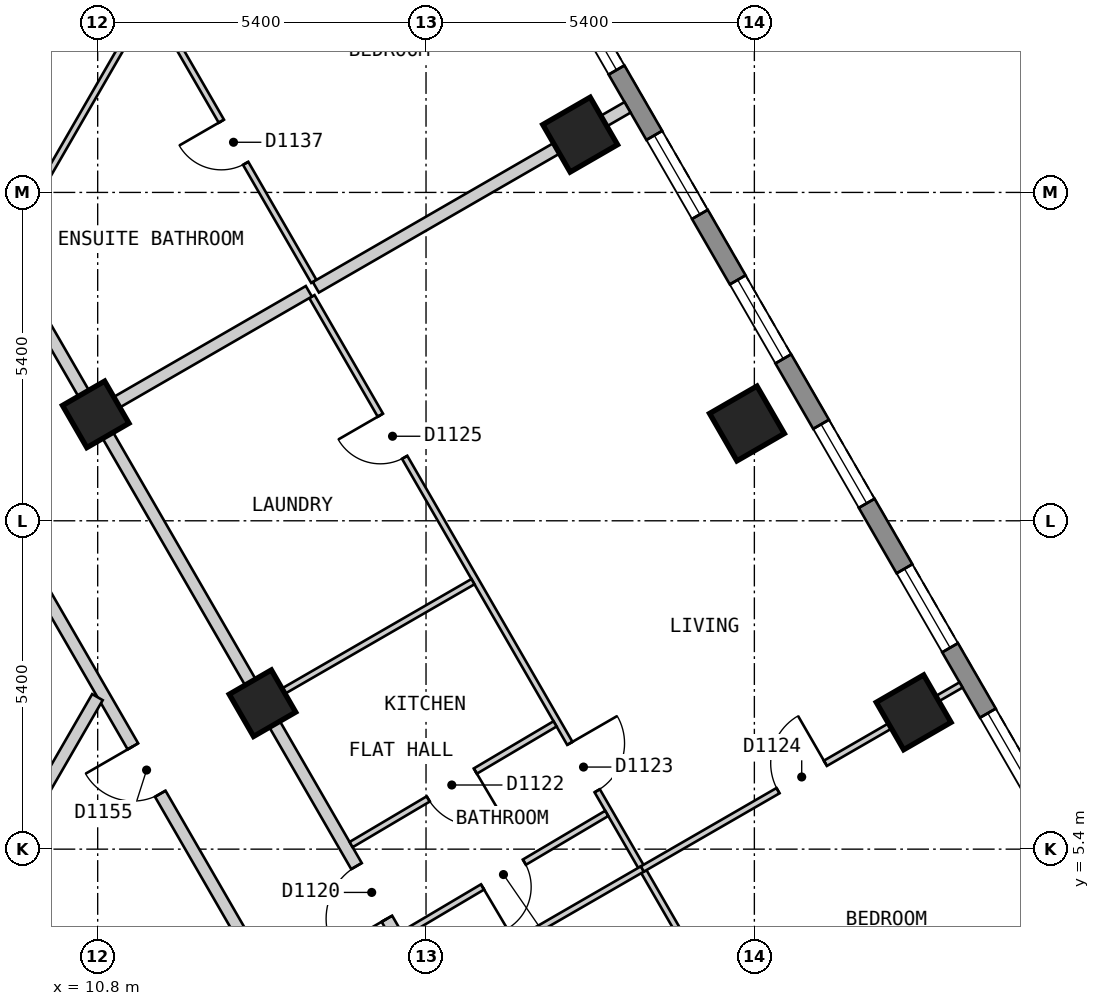
"""IFC4 building model, lengths in metres.
Left out: names, types, materials, properties, quantities, classifications, styles, units other than length and angle.
Written with IfcOpenShell. Run it as: python <this file> out.ifc"""

import sys

from ifc_helpers import new_model, si_unit, direction, frame, frame_2d, origin, origin_2d, place, context, subcontext, project, spatial, polyline, rectangle, outline, extrude, element, fill, save


model = new_model("IFC4")
c1 = context("Model", 3, precision=1e-05, world=origin(), true_north=direction((0.0, 1.0)))
c2 = subcontext(c1, "Body", "Model", "MODEL_VIEW")
j1 = project(units=[si_unit("LENGTHUNIT", "METRE"), si_unit("PLANEANGLEUNIT", "RADIAN")], contexts=[c1])
p1 = place(None, origin())
s1 = spatial("IfcSite", under=j1, at=p1, CompositionType="ELEMENT")
p2 = place(p1, origin())
s2 = spatial("IfcBuilding", under=s1, at=p2, CompositionType="ELEMENT")
p3 = place(p2, frame((0.0, 0.0, 144.6)))
s3 = spatial("IfcBuildingStorey", under=s2, at=p3, CompositionType="ELEMENT", Elevation=144.6)
for number, where, z_axis, x_axis in (
    (1, (24.22, 7.65, 0.0), (0.0, 0.0, 1.0), (-0.5, 0.866, 0.0)),
    (2, (21.478, 12.4, 0.0), (0.0, 0.0, 1.0), (-0.5, 0.866, 0.0)),
    (3, (18.735, 17.15, 0.0), (0.0, 0.0, 1.0), (-0.5, 0.866, 0.0)),
):
    element("IfcColumn", number, at=place(p3, frame(where, z_axis=z_axis, x_axis=x_axis)), inside=s3, PredefinedType="COLUMN", context=c2, shape_type="SweptSolid", body=[
        extrude(rectangle(XDim=0.9, YDim=0.9, at=origin_2d()), origin(), (0.0, 0.0, 1.0), 3.0),
    ])
for number, where, z_axis, x_axis in (
    (4, (13.51, 7.8, 0.0), (0.0, 0.0, 1.0), (-0.5, 0.866, 0.0)),
    (5, (10.768, 12.55, 0.0), (0.0, 0.0, 1.0), (-0.5, 0.866, 0.0)),
):
    element("IfcColumn", number, at=place(p3, frame(where, z_axis=z_axis, x_axis=x_axis)), inside=s3, PredefinedType="COLUMN", context=c2, shape_type="SweptSolid", body=[
        extrude(rectangle(XDim=0.8, YDim=0.8, at=origin_2d()), origin(), (0.0, 0.0, 1.0), 3.0),
    ])
p4 = place(p3, frame((28.218, 2.825, 0.0), z_axis=(0.0, 0.0, 1.0), x_axis=(-0.500020536353, 0.866013546791, 0.0)))
e6 = element("IfcWall", 6, at=p4, inside=s3, PredefinedType="SOLIDWALL", context=c2, shape_type="SweptSolid", body=[
    extrude(outline(polyline([(0.0, -0.15), (23.325, -0.15), (23.245, 0.15), (0.08, 0.15), (0.0, -0.15)])), origin(), (0.0, 0.0, 1.0), 2.7),
])
p5 = place(p4, frame((1.314, 0.0, 0.15)))
e7 = element("IfcOpeningElement", 7, at=p5, cuts=e6, PredefinedType="OPENING", context=c2, shape_type="SweptSolid", body=[
    extrude(rectangle(XDim=1.5, YDim=2.1, at=frame_2d((0.75, 1.05))), frame((0.0, 0.16, 0.0), z_axis=(0.0, -1.0, 0.0), x_axis=(1.0, 0.0, 0.0)), (0.0, 0.0, 1.0), 0.32),
])
p6 = place(p4, frame((4.056, 0.0, 0.15)))
e8 = element("IfcOpeningElement", 8, at=p6, cuts=e6, PredefinedType="OPENING", context=c2, shape_type="SweptSolid", body=[
    extrude(rectangle(XDim=1.5, YDim=2.1, at=frame_2d((0.75, 1.05))), frame((0.0, 0.16, 0.0), z_axis=(0.0, -1.0, 0.0), x_axis=(1.0, 0.0, 0.0)), (0.0, 0.0, 1.0), 0.32),
])
p7 = place(p4, frame((6.798, 0.0, 0.15)))
e9 = element("IfcOpeningElement", 9, at=p7, cuts=e6, PredefinedType="OPENING", context=c2, shape_type="SweptSolid", body=[
    extrude(rectangle(XDim=1.5, YDim=2.1, at=frame_2d((0.75, 1.05))), frame((0.0, 0.16, 0.0), z_axis=(0.0, -1.0, 0.0), x_axis=(1.0, 0.0, 0.0)), (0.0, 0.0, 1.0), 0.32),
])
p8 = place(p4, frame((9.541, 0.0, 0.15)))
e10 = element("IfcOpeningElement", 10, at=p8, cuts=e6, PredefinedType="OPENING", context=c2, shape_type="SweptSolid", body=[
    extrude(rectangle(XDim=1.5, YDim=2.1, at=frame_2d((0.75, 1.05))), frame((0.0, 0.16, 0.0), z_axis=(0.0, -1.0, 0.0), x_axis=(1.0, 0.0, 0.0)), (0.0, 0.0, 1.0), 0.32),
])
p9 = place(p4, frame((12.284, 0.0, 0.15)))
e11 = element("IfcOpeningElement", 11, at=p9, cuts=e6, PredefinedType="OPENING", context=c2, shape_type="SweptSolid", body=[
    extrude(rectangle(XDim=1.5, YDim=2.1, at=frame_2d((0.75, 1.05))), frame((0.0, 0.16, 0.0), z_axis=(0.0, -1.0, 0.0), x_axis=(1.0, 0.0, 0.0)), (0.0, 0.0, 1.0), 0.32),
])
p10 = place(p4, frame((15.027, 0.0, 0.15)))
e12 = element("IfcOpeningElement", 12, at=p10, cuts=e6, PredefinedType="OPENING", context=c2, shape_type="SweptSolid", body=[
    extrude(rectangle(XDim=1.5, YDim=2.1, at=frame_2d((0.75, 1.05))), frame((0.0, 0.16, 0.0), z_axis=(0.0, -1.0, 0.0), x_axis=(1.0, 0.0, 0.0)), (0.0, 0.0, 1.0), 0.32),
])
p11 = place(p4, frame((17.769, 0.0, 0.15)))
e13 = element("IfcOpeningElement", 13, at=p11, cuts=e6, PredefinedType="OPENING", context=c2, shape_type="SweptSolid", body=[
    extrude(rectangle(XDim=1.5, YDim=2.1, at=frame_2d((0.75, 1.05))), frame((0.0, 0.16, 0.0), z_axis=(0.0, -1.0, 0.0), x_axis=(1.0, 0.0, 0.0)), (0.0, 0.0, 1.0), 0.32),
])
p12 = place(p4, frame((20.511, 0.0, 0.15)))
e14 = element("IfcOpeningElement", 14, at=p12, cuts=e6, PredefinedType="OPENING", context=c2, shape_type="SweptSolid", body=[
    extrude(rectangle(XDim=1.5, YDim=2.1, at=frame_2d((0.75, 1.05))), frame((0.0, 0.16, 0.0), z_axis=(0.0, -1.0, 0.0), x_axis=(1.0, 0.0, 0.0)), (0.0, 0.0, 1.0), 0.32),
])
p13 = place(p3, frame((7.967, 13.0, 0.0), z_axis=(0.0, 0.0, 1.0), x_axis=(0.50003774998, -0.866003607726, 0.0)))
e15 = element("IfcWall", 15, at=p13, inside=s3, PredefinedType="PARTITIONING", context=c2, shape_type="SweptSolid", body=[
    extrude(rectangle(XDim=14.433, YDim=0.2, at=frame_2d((7.217, 0.0))), origin(), (0.0, 0.0, 1.0), 2.7),
])
p14 = place(p13, frame((6.824, 0.0, 0.0)))
e16 = element("IfcOpeningElement", 16, at=p14, cuts=e15, PredefinedType="OPENING", context=c2, shape_type="SweptSolid", body=[
    extrude(rectangle(XDim=0.9, YDim=2.1, at=frame_2d((0.45, 1.05))), frame((0.0, 0.11, 0.0), z_axis=(0.0, -1.0, 0.0), x_axis=(1.0, 0.0, 0.0)), (0.0, 0.0, 1.0), 0.22),
])
p15 = place(p3, frame((9.296, 15.1, 0.0), z_axis=(0.0, 0.0, 1.0), x_axis=(0.499974024244, -0.866040400375, 0.0)))
e17 = element("IfcWall", 17, at=p15, inside=s3, PredefinedType="PARTITIONING", context=c2, shape_type="SweptSolid", body=[
    extrude(rectangle(XDim=16.857, YDim=0.2, at=frame_2d((8.429, 0.0))), origin(), (0.0, 0.0, 1.0), 2.7),
])
p16 = place(p15, frame((11.522, 0.0, 0.0)))
e18 = element("IfcOpeningElement", 18, at=p16, cuts=e17, PredefinedType="OPENING", context=c2, shape_type="SweptSolid", body=[
    extrude(rectangle(XDim=1.0, YDim=2.1, at=frame_2d((0.5, 1.05))), frame((0.0, 0.11, 0.0), z_axis=(0.0, -1.0, 0.0), x_axis=(1.0, 0.0, 0.0)), (0.0, 0.0, 1.0), 0.22),
])
p17 = place(p3, frame((7.028, 1.373, 0.0), z_axis=(0.0, 0.0, 1.0), x_axis=(0.499954271211, 0.866051803703, 0.0)))
e19 = element("IfcWall", 19, at=p17, inside=s3, PredefinedType="PARTITIONING", context=c2, shape_type="SweptSolid", body=[
    extrude(rectangle(XDim=7.536, YDim=0.2, at=frame_2d((3.768, 0.0))), origin(), (0.0, 0.0, 1.0), 2.7),
])
p18 = place(p3, frame((14.323, 14.487, 0.0), z_axis=(0.0, 0.0, 1.0), x_axis=(0.500011052545, -0.866019022501, 0.0)))
e20 = element("IfcWall", 20, at=p18, inside=s3, PredefinedType="PARTITIONING", context=c2, shape_type="SweptSolid", body=[
    extrude(rectangle(XDim=16.208, YDim=0.1, at=frame_2d((8.104, 0.0))), origin(), (0.0, 0.0, 1.0), 2.7),
])
p19 = place(p18, frame((8.484, 0.0, 0.0)))
e21 = element("IfcOpeningElement", 21, at=p19, cuts=e20, PredefinedType="OPENING", context=c2, shape_type="SweptSolid", body=[
    extrude(rectangle(XDim=0.9, YDim=2.1, at=frame_2d((0.45, 1.05))), frame((0.0, 0.06, 0.0), z_axis=(0.0, -1.0, 0.0), x_axis=(1.0, 0.0, 0.0)), (0.0, 0.0, 1.0), 0.12),
])
p20 = place(p18, frame((2.252, 0.0, 0.0)))
e22 = element("IfcOpeningElement", 22, at=p20, cuts=e20, PredefinedType="OPENING", context=c2, shape_type="SweptSolid", body=[
    extrude(rectangle(XDim=0.8, YDim=2.1, at=frame_2d((0.4, 1.05))), frame((0.0, 0.06, 0.0), z_axis=(0.0, -1.0, 0.0), x_axis=(1.0, 0.0, 0.0)), (0.0, 0.0, 1.0), 0.12),
])
p21 = place(p18, frame((13.167, 0.0, 0.0)))
e23 = element("IfcOpeningElement", 23, at=p21, cuts=e20, PredefinedType="OPENING", context=c2, shape_type="SweptSolid", body=[
    extrude(rectangle(XDim=0.8, YDim=2.1, at=frame_2d((0.4, 1.05))), frame((0.0, 0.06, 0.0), z_axis=(0.0, -1.0, 0.0), x_axis=(1.0, 0.0, 0.0)), (0.0, 0.0, 1.0), 0.12),
])
p22 = place(p3, frame((11.713, 19.313, 0.0), z_axis=(0.0, 0.0, 1.0), x_axis=(0.499945064984, -0.866057118208, 0.0)))
e24 = element("IfcWall", 24, at=p22, inside=s3, PredefinedType="PARTITIONING", context=c2, shape_type="SweptSolid", body=[
    extrude(rectangle(XDim=5.285, YDim=0.1, at=frame_2d((2.642, 0.0))), origin(), (0.0, 0.0, 1.0), 2.7),
])
p23 = place(p22, frame((2.242, 0.0, 0.0)))
e25 = element("IfcOpeningElement", 25, at=p23, cuts=e24, PredefinedType="OPENING", context=c2, shape_type="SweptSolid", body=[
    extrude(rectangle(XDim=0.8, YDim=2.1, at=frame_2d((0.4, 1.05))), frame((0.0, 0.06, 0.0), z_axis=(0.0, -1.0, 0.0), x_axis=(1.0, 0.0, 0.0)), (0.0, 0.0, 1.0), 0.12),
])
p24 = place(p3, frame((9.238, 15.2, 0.0), z_axis=(0.0, 0.0, 1.0), x_axis=(0.499988022762, 0.866032318735, 0.0)))
e26 = element("IfcWall", 26, at=p24, inside=s3, PredefinedType="PARTITIONING", context=c2, shape_type="SweptSolid", body=[
    extrude(rectangle(XDim=4.748, YDim=0.1, at=frame_2d((2.374, 0.0))), origin(), (0.0, 0.0, 1.0), 2.7),
])
p25 = place(p3, frame((16.339, 3.1, 0.0), z_axis=(0.0, 0.0, 1.0), x_axis=(0.866031112038, 0.499990112884, 0.0)))
e27 = element("IfcWall", 27, at=p25, inside=s3, PredefinedType="PARTITIONING", context=c2, shape_type="SweptSolid", body=[
    extrude(rectangle(XDim=3.948, YDim=0.1, at=frame_2d((1.974, 0.0))), origin(), (0.0, 0.0, 1.0), 2.7),
])
p26 = place(p3, frame((13.597, 7.85, 0.0), z_axis=(0.0, 0.0, 1.0), x_axis=(0.865979019114, 0.500080332001, 0.0)))
e28 = element("IfcWall", 28, at=p26, inside=s3, PredefinedType="PARTITIONING", context=c2, shape_type="SweptSolid", body=[
    extrude(rectangle(XDim=3.897, YDim=0.1, at=frame_2d((1.949, 0.0))), origin(), (0.0, 0.0, 1.0), 2.7),
])
p27 = place(p3, frame((15.818, 4.002, 0.0), z_axis=(0.0, 0.0, 1.0), x_axis=(0.860457323494, 0.509522516132, 0.0)))
e29 = element("IfcWall", 29, at=p27, inside=s3, PredefinedType="PARTITIONING", context=c2, shape_type="SweptSolid", body=[
    extrude(rectangle(XDim=3.898, YDim=0.1, at=frame_2d((1.949, 0.0))), origin(), (0.0, 0.0, 1.0), 2.7),
])
p28 = place(p27, frame((1.524, 0.0, 0.0)))
e30 = element("IfcOpeningElement", 30, at=p28, cuts=e29, PredefinedType="OPENING", context=c2, shape_type="SweptSolid", body=[
    extrude(rectangle(XDim=0.8, YDim=2.1, at=frame_2d((0.4, 1.05))), frame((0.0, 0.06, 0.0), z_axis=(0.0, -1.0, 0.0), x_axis=(1.0, 0.0, 0.0)), (0.0, 0.0, 1.0), 0.12),
])
p29 = place(p3, frame((14.968, 5.475, 0.0), z_axis=(0.0, 0.0, 1.0), x_axis=(0.860594613521, 0.509290596005, 0.0)))
e31 = element("IfcWall", 31, at=p29, inside=s3, PredefinedType="PARTITIONING", context=c2, shape_type="SweptSolid", body=[
    extrude(rectangle(XDim=3.897, YDim=0.1, at=frame_2d((1.949, 0.0))), origin(), (0.0, 0.0, 1.0), 2.7),
])
p30 = place(p29, frame((1.474, 0.0, 0.0)))
e32 = element("IfcOpeningElement", 32, at=p30, cuts=e31, PredefinedType="OPENING", context=c2, shape_type="SweptSolid", body=[
    extrude(rectangle(XDim=0.9, YDim=2.1, at=frame_2d((0.45, 1.05))), frame((0.0, 0.06, 0.0), z_axis=(0.0, -1.0, 0.0), x_axis=(1.0, 0.0, 0.0)), (0.0, 0.0, 1.0), 0.12),
])
p31 = place(p3, frame((10.854, 12.6, 0.0), z_axis=(0.0, 0.0, 1.0), x_axis=(0.866031112038, 0.499990112884, 0.0)))
e33 = element("IfcWall", 33, at=p31, inside=s3, PredefinedType="PARTITIONING", context=c2, shape_type="SweptSolid", body=[
    extrude(rectangle(XDim=3.948, YDim=0.2, at=frame_2d((1.974, 0.0))), origin(), (0.0, 0.0, 1.0), 2.7),
])
p32 = place(p3, frame((14.388, 14.64, 0.0), z_axis=(0.0, 0.0, 1.0), x_axis=(0.866044090212, 0.499967632761, 0.0)))
e34 = element("IfcWall", 34, at=p32, inside=s3, PredefinedType="PARTITIONING", context=c2, shape_type="SweptSolid", body=[
    extrude(rectangle(XDim=5.919, YDim=0.2, at=frame_2d((2.959, 0.0))), origin(), (0.0, 0.0, 1.0), 2.7),
])
p33 = place(p3, frame((19.758, 5.074, 0.0), z_axis=(0.0, 0.0, 1.0), x_axis=(0.866007554612, 0.500030914399, 0.0)))
e35 = element("IfcWall", 35, at=p33, inside=s3, PredefinedType="PARTITIONING", context=c2, shape_type="SweptSolid", body=[
    extrude(rectangle(XDim=6.052, YDim=0.1, at=frame_2d((3.026, 0.0))), origin(), (0.0, 0.0, 1.0), 2.7),
])
p34 = place(p33, frame((2.576, 0.0, 0.0)))
e36 = element("IfcOpeningElement", 36, at=p34, cuts=e35, PredefinedType="OPENING", context=c2, shape_type="SweptSolid", body=[
    extrude(rectangle(XDim=0.9, YDim=2.1, at=frame_2d((0.45, 1.05))), frame((0.0, 0.06, 0.0), z_axis=(0.0, -1.0, 0.0), x_axis=(1.0, 0.0, 0.0)), (0.0, 0.0, 1.0), 0.12),
])
p35 = place(p6, origin())
e37 = element("IfcWindow", 37, at=p35, inside=s3, PartitioningType="SINGLE_PANEL", PredefinedType="WINDOW", context=c2, shape_type="SweptSolid", body=[
    extrude(rectangle(XDim=1.5, YDim=2.1, at=frame_2d((0.75, 1.05))), frame((0.0, 0.03, 0.0), z_axis=(0.0, -1.0, 0.0), x_axis=(1.0, 0.0, 0.0)), (0.0, 0.0, 1.0), 0.06),
])
fill(e8, e37)
p36 = place(p7, origin())
e38 = element("IfcWindow", 38, at=p36, inside=s3, PartitioningType="SINGLE_PANEL", PredefinedType="WINDOW", context=c2, shape_type="SweptSolid", body=[
    extrude(rectangle(XDim=1.5, YDim=2.1, at=frame_2d((0.75, 1.05))), frame((0.0, 0.03, 0.0), z_axis=(0.0, -1.0, 0.0), x_axis=(1.0, 0.0, 0.0)), (0.0, 0.0, 1.0), 0.06),
])
fill(e9, e38)
p37 = place(p8, origin())
e39 = element("IfcWindow", 39, at=p37, inside=s3, PartitioningType="SINGLE_PANEL", PredefinedType="WINDOW", context=c2, shape_type="SweptSolid", body=[
    extrude(rectangle(XDim=1.5, YDim=2.1, at=frame_2d((0.75, 1.05))), frame((0.0, 0.03, 0.0), z_axis=(0.0, -1.0, 0.0), x_axis=(1.0, 0.0, 0.0)), (0.0, 0.0, 1.0), 0.06),
])
fill(e10, e39)
p38 = place(p9, origin())
e40 = element("IfcWindow", 40, at=p38, inside=s3, PartitioningType="SINGLE_PANEL", PredefinedType="WINDOW", context=c2, shape_type="SweptSolid", body=[
    extrude(rectangle(XDim=1.5, YDim=2.1, at=frame_2d((0.75, 1.05))), frame((0.0, 0.03, 0.0), z_axis=(0.0, -1.0, 0.0), x_axis=(1.0, 0.0, 0.0)), (0.0, 0.0, 1.0), 0.06),
])
fill(e11, e40)
p39 = place(p10, origin())
e41 = element("IfcWindow", 41, at=p39, inside=s3, PartitioningType="SINGLE_PANEL", PredefinedType="WINDOW", context=c2, shape_type="SweptSolid", body=[
    extrude(rectangle(XDim=1.5, YDim=2.1, at=frame_2d((0.75, 1.05))), frame((0.0, 0.03, 0.0), z_axis=(0.0, -1.0, 0.0), x_axis=(1.0, 0.0, 0.0)), (0.0, 0.0, 1.0), 0.06),
])
fill(e12, e41)
p40 = place(p11, origin())
e42 = element("IfcWindow", 42, at=p40, inside=s3, PartitioningType="SINGLE_PANEL", PredefinedType="WINDOW", context=c2, shape_type="SweptSolid", body=[
    extrude(rectangle(XDim=1.5, YDim=2.1, at=frame_2d((0.75, 1.05))), frame((0.0, 0.03, 0.0), z_axis=(0.0, -1.0, 0.0), x_axis=(1.0, 0.0, 0.0)), (0.0, 0.0, 1.0), 0.06),
])
fill(e13, e42)
p41 = place(p16, origin())
e43 = element("IfcDoor", 43, at=p41, inside=s3, OperationType="SINGLE_SWING_RIGHT", PredefinedType="DOOR", context=c2, shape_type="SweptSolid", body=[
    extrude(rectangle(XDim=1.0, YDim=2.1, at=frame_2d((0.5, 1.05))), frame((0.0, 0.025, 0.0), z_axis=(0.0, -1.0, 0.0), x_axis=(1.0, 0.0, 0.0)), (0.0, 0.0, 1.0), 0.05),
])
fill(e18, e43)
p42 = place(p28, origin())
e44 = element("IfcDoor", 44, at=p42, inside=s3, OperationType="SINGLE_SWING_LEFT", PredefinedType="DOOR", context=c2, shape_type="SweptSolid", body=[
    extrude(rectangle(XDim=0.8, YDim=2.1, at=frame_2d((0.4, 1.05))), frame((0.0, 0.025, 0.0), z_axis=(0.0, -1.0, 0.0), x_axis=(1.0, 0.0, 0.0)), (0.0, 0.0, 1.0), 0.05),
])
fill(e30, e44)
p43 = place(p30, origin())
e45 = element("IfcDoor", 45, at=p43, inside=s3, OperationType="SINGLE_SWING_RIGHT", PredefinedType="DOOR", context=c2, shape_type="SweptSolid", body=[
    extrude(rectangle(XDim=0.9, YDim=2.1, at=frame_2d((0.45, 1.05))), frame((0.0, 0.025, 0.0), z_axis=(0.0, -1.0, 0.0), x_axis=(1.0, 0.0, 0.0)), (0.0, 0.0, 1.0), 0.05),
])
fill(e32, e45)
p44 = place(p19, origin())
e46 = element("IfcDoor", 46, at=p44, inside=s3, OperationType="SINGLE_SWING_LEFT", PredefinedType="DOOR", context=c2, shape_type="SweptSolid", body=[
    extrude(rectangle(XDim=0.9, YDim=2.1, at=frame_2d((0.45, 1.05))), frame((0.0, 0.025, 0.0), z_axis=(0.0, -1.0, 0.0), x_axis=(1.0, 0.0, 0.0)), (0.0, 0.0, 1.0), 0.05),
])
fill(e21, e46)
p45 = place(p34, origin())
e47 = element("IfcDoor", 47, at=p45, inside=s3, OperationType="SINGLE_SWING_RIGHT", PredefinedType="DOOR", context=c2, shape_type="SweptSolid", body=[
    extrude(rectangle(XDim=0.9, YDim=2.1, at=frame_2d((0.45, 1.05))), frame((0.0, 0.025, 0.0), z_axis=(0.0, -1.0, 0.0), x_axis=(1.0, 0.0, 0.0)), (0.0, 0.0, 1.0), 0.05),
])
fill(e36, e47)
p46 = place(p20, origin())
e48 = element("IfcDoor", 48, at=p46, inside=s3, OperationType="SINGLE_SWING_LEFT", PredefinedType="DOOR", context=c2, shape_type="SweptSolid", body=[
    extrude(rectangle(XDim=0.8, YDim=2.1, at=frame_2d((0.4, 1.05))), frame((0.0, 0.025, 0.0), z_axis=(0.0, -1.0, 0.0), x_axis=(1.0, 0.0, 0.0)), (0.0, 0.0, 1.0), 0.05),
])
fill(e22, e48)
p47 = place(p23, origin())
e49 = element("IfcDoor", 49, at=p47, inside=s3, OperationType="SINGLE_SWING_LEFT", PredefinedType="DOOR", context=c2, shape_type="SweptSolid", body=[
    extrude(rectangle(XDim=0.8, YDim=2.1, at=frame_2d((0.4, 1.05))), frame((0.0, 0.025, 0.0), z_axis=(0.0, -1.0, 0.0), x_axis=(1.0, 0.0, 0.0)), (0.0, 0.0, 1.0), 0.05),
])
fill(e25, e49)
p48 = place(p14, origin())
e50 = element("IfcDoor", 50, at=p48, inside=s3, OperationType="SINGLE_SWING_LEFT", PredefinedType="DOOR", context=c2, shape_type="SweptSolid", body=[
    extrude(rectangle(XDim=0.9, YDim=2.1, at=frame_2d((0.45, 1.05))), frame((0.0, 0.025, 0.0), z_axis=(0.0, -1.0, 0.0), x_axis=(1.0, 0.0, 0.0)), (0.0, 0.0, 1.0), 0.05),
])
fill(e16, e50)
save(model, sys.argv[1])
